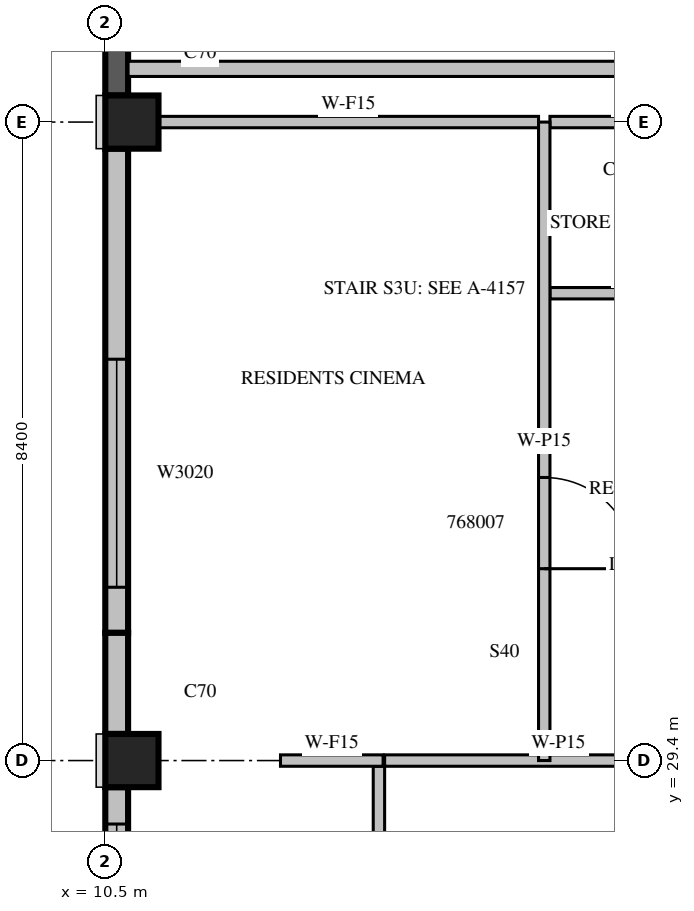
"""IFC4 building model, lengths in metres.
Left out: names, types, materials, properties, quantities, classifications, styles, units other than length and angle.
Written with IfcOpenShell. Run it as: python <this file> out.ifc"""

import sys

from ifc_helpers import new_model, si_unit, direction, frame, frame_2d, origin, origin_2d, place, context, subcontext, project, spatial, rectangle, extrude, source, transform, mapped, element, fill, save


model = new_model("IFC4")
c1 = context("Model", 3, precision=1e-05, world=origin(), true_north=direction((0.0, 1.0)))
c2 = subcontext(c1, "Body", "Model", "MODEL_VIEW")
j1 = project(units=[si_unit("LENGTHUNIT", "METRE"), si_unit("PLANEANGLEUNIT", "RADIAN")], contexts=[c1])
p1 = place(None, origin())
s1 = spatial("IfcSite", under=j1, at=p1, CompositionType="ELEMENT")
p2 = place(p1, origin())
s2 = spatial("IfcBuilding", under=s1, at=p2, CompositionType="ELEMENT")
p3 = place(p2, frame((0.0, 0.0, 298.5)))
s3 = spatial("IfcBuildingStorey", under=s2, at=p3, CompositionType="ELEMENT", Elevation=298.5)
m1 = source(origin(), c2, "Body", "SweptSolid", [
    extrude(rectangle(XDim=0.7, YDim=0.7, at=origin_2d()), origin(), (0.0, 0.0, 1.0), 3.5),
])
for number, where, z_axis, x_axis in (
    (1, (10.85, 29.4, 0.0), (0.0, 0.0, 1.0), (1.0, 0.0, 0.0)),
    (2, (10.85, 37.8, 0.0), (0.0, 0.0, 1.0), (1.0, 0.0, 0.0)),
):
    element("IfcColumn", number, at=place(p3, frame(where, z_axis=z_axis, x_axis=x_axis)), inside=s3, PredefinedType="COLUMN", context=c2, shape_type="MappedRepresentation", body=[
        mapped(m1, transform((0.0, 0.0, 0.0), scale=1.0)),
    ])
m2 = source(origin(), c2, "Body", "SweptSolid", [
    extrude(rectangle(XDim=5.53, YDim=0.3, at=frame_2d((2.765, 0.0))), origin(), (0.0, 0.0, 1.0), 3.1),
])
p4 = place(p3, frame((10.65, 43.68, 0.0), z_axis=(0.0, 0.0, 1.0), x_axis=(0.0, -1.0, 0.0)))
e3 = element("IfcWall", 3, at=p4, inside=s3, PredefinedType="SOLIDWALL", context=c2, shape_type="MappedRepresentation", body=[
    mapped(m2, transform((0.0, 0.0, 0.0), scale=1.0)),
])
m3 = source(origin(), c2, "Body", "SweptSolid", [
    extrude(rectangle(XDim=6.37, YDim=0.3, at=frame_2d((3.185, 0.0))), origin(), (0.0, 0.0, 1.0), 3.1),
])
p5 = place(p3, frame((10.65, 37.45, 0.0), z_axis=(0.0, 0.0, 1.0), x_axis=(0.0, -1.0, 0.0)))
e4 = element("IfcWall", 4, at=p5, inside=s3, PredefinedType="STANDARD", context=c2, shape_type="MappedRepresentation", body=[
    mapped(m3, transform((0.0, 0.0, 0.0), scale=1.0)),
])
m4 = source(origin(), c2, "Body", "SweptSolid", [
    extrude(rectangle(XDim=3.0, YDim=2.0, at=frame_2d((1.5, 1.0))), frame((0.0, 0.16, 0.0), z_axis=(0.0, -1.0, 0.0), x_axis=(1.0, 0.0, 0.0)), (0.0, 0.0, 1.0), 0.32),
])
p6 = place(p5, frame((2.77, 0.0, 0.6)))
e5 = element("IfcOpeningElement", 5, at=p6, cuts=e4, PredefinedType="OPENING", context=c2, shape_type="MappedRepresentation", body=[
    mapped(m4, transform((0.0, 0.0, 0.0), scale=1.0)),
])
m5 = source(origin(), c2, "Body", "SweptSolid", [
    extrude(rectangle(XDim=1.33, YDim=0.3, at=frame_2d((0.665, 0.0))), origin(), (0.0, 0.0, 1.0), 3.1),
])
p7 = place(p3, frame((10.65, 31.08, 0.0), z_axis=(0.0, 0.0, 1.0), x_axis=(0.0, -1.0, 0.0)))
e6 = element("IfcWall", 6, at=p7, inside=s3, PredefinedType="STANDARD", context=c2, shape_type="MappedRepresentation", body=[
    mapped(m5, transform((0.0, 0.0, 0.0), scale=1.0)),
])
m6 = source(origin(), c2, "Body", "SweptSolid", [
    extrude(rectangle(XDim=2.17, YDim=0.3, at=frame_2d((1.085, 0.0))), origin(), (0.0, 0.0, 1.0), 3.1),
])
p8 = place(p3, frame((10.65, 29.05, 0.0), z_axis=(0.0, 0.0, 1.0), x_axis=(0.0, -1.0, 0.0)))
e7 = element("IfcWall", 7, at=p8, inside=s3, PredefinedType="STANDARD", context=c2, shape_type="MappedRepresentation", body=[
    mapped(m6, transform((0.0, 0.0, 0.0), scale=1.0)),
])
m7 = source(origin(), c2, "Body", "SweptSolid", [
    extrude(rectangle(XDim=1.2, YDim=2.0, at=frame_2d((0.6, 1.0))), frame((0.0, 0.16, 0.0), z_axis=(0.0, -1.0, 0.0), x_axis=(1.0, 0.0, 0.0)), (0.0, 0.0, 1.0), 0.32),
])
p9 = place(p8, frame((0.485, 0.0, 0.6)))
e8 = element("IfcOpeningElement", 8, at=p9, cuts=e7, PredefinedType="OPENING", context=c2, shape_type="MappedRepresentation", body=[
    mapped(m7, transform((0.0, 0.0, 0.0), scale=1.0)),
])
m8 = source(origin(), c2, "Body", "SweptSolid", [
    extrude(rectangle(XDim=8.0, YDim=0.2, at=frame_2d((4.0, 0.0))), origin(), (0.0, 0.0, 1.0), 3.1),
])
p10 = place(p3, frame((10.8, 38.5, 0.0), z_axis=(0.0, 0.0, 1.0), x_axis=(1.0, 0.0, 0.0)))
e9 = element("IfcWall", 9, at=p10, inside=s3, PredefinedType="PARTITIONING", context=c2, shape_type="MappedRepresentation", body=[
    mapped(m8, transform((0.0, 0.0, 0.0), scale=1.0)),
])
m9 = source(origin(), c2, "Body", "SweptSolid", [
    extrude(rectangle(XDim=4.575, YDim=0.15, at=frame_2d((2.288, 0.0))), origin(), (0.0, 0.0, 1.0), 3.1),
])
p11 = place(p3, frame((18.75, 29.4, 0.0), z_axis=(0.0, 0.0, 1.0), x_axis=(-1.0, 0.0, 0.0)))
e10 = element("IfcWall", 10, at=p11, inside=s3, PredefinedType="PARTITIONING", context=c2, shape_type="MappedRepresentation", body=[
    mapped(m9, transform((0.0, 0.0, 0.0), scale=1.0)),
])
m10 = source(origin(), c2, "Body", "SweptSolid", [
    extrude(rectangle(XDim=7.725, YDim=0.15, at=frame_2d((3.862, 0.0))), origin(), (0.0, 0.0, 1.0), 3.1),
])
p12 = place(p3, frame((14.1, 29.325, 0.0), z_axis=(0.0, 0.0, 1.0), x_axis=(0.0, -1.0, 0.0)))
e11 = element("IfcWall", 11, at=p12, inside=s3, PredefinedType="PARTITIONING", context=c2, shape_type="MappedRepresentation", body=[
    mapped(m10, transform((0.0, 0.0, 0.0), scale=1.0)),
])
m11 = source(origin(), c2, "Body", "SweptSolid", [
    extrude(rectangle(XDim=1.0, YDim=2.1, at=frame_2d((0.5, 1.05))), frame((0.0, 0.085, 0.0), z_axis=(0.0, -1.0, 0.0), x_axis=(1.0, 0.0, 0.0)), (0.0, 0.0, 1.0), 0.17),
])
p13 = place(p12, frame((6.275, 0.0, 0.0)))
e12 = element("IfcOpeningElement", 12, at=p13, cuts=e11, PredefinedType="OPENING", context=c2, shape_type="MappedRepresentation", body=[
    mapped(m11, transform((0.0, 0.0, 0.0), scale=1.0)),
])
m12 = source(origin(), c2, "Body", "SweptSolid", [
    extrude(rectangle(XDim=2.4, YDim=0.15, at=frame_2d((1.2, 0.0))), origin(), (0.0, 0.0, 1.0), 3.1),
])
p14 = place(p3, frame((18.75, 35.548, 0.0), z_axis=(0.0, 0.0, 1.0), x_axis=(-1.0, 0.0, 0.0)))
e13 = element("IfcWall", 13, at=p14, inside=s3, PredefinedType="PARTITIONING", context=c2, shape_type="MappedRepresentation", body=[
    mapped(m12, transform((0.0, 0.0, 0.0), scale=1.0)),
])
m13 = source(origin(), c2, "Body", "SweptSolid", [
    extrude(rectangle(XDim=1.35, YDim=0.15, at=frame_2d((0.675, 0.0))), origin(), (0.0, 0.0, 1.0), 3.1),
])
p15 = place(p3, frame((14.155, 29.4, 0.0), z_axis=(0.0, 0.0, 1.0), x_axis=(-1.0, 0.0, 0.0)))
e14 = element("IfcWall", 14, at=p15, inside=s3, PredefinedType="PARTITIONING", context=c2, shape_type="MappedRepresentation", body=[
    mapped(m13, transform((0.0, 0.0, 0.0), scale=1.0)),
])
m14 = source(origin(), c2, "Body", "SweptSolid", [
    extrude(rectangle(XDim=5.001, YDim=0.15, at=frame_2d((2.501, 0.0))), origin(), (0.0, 0.0, 1.0), 3.1),
])
p16 = place(p3, frame((16.2, 37.8, 0.0), z_axis=(0.0, 0.0, 1.0), x_axis=(-1.0, 0.0, 0.0)))
e15 = element("IfcWall", 15, at=p16, inside=s3, PredefinedType="PARTITIONING", context=c2, shape_type="MappedRepresentation", body=[
    mapped(m14, transform((0.0, 0.0, 0.0), scale=1.0)),
])
p17 = place(p3, frame((18.75, 37.8, 0.0), z_axis=(0.0, 0.0, 1.0), x_axis=(-1.0, 0.0, 0.0)))
e16 = element("IfcWall", 16, at=p17, inside=s3, PredefinedType="PARTITIONING", context=c2, shape_type="MappedRepresentation", body=[
    mapped(m12, transform((0.0, 0.0, 0.0), scale=1.0)),
])
m15 = source(origin(), c2, "Body", "SweptSolid", [
    extrude(rectangle(XDim=8.4, YDim=0.15, at=frame_2d((4.2, 0.0))), origin(), (0.0, 0.0, 1.0), 3.1),
])
p18 = place(p3, frame((16.275, 29.4, 0.0), z_axis=(0.0, 0.0, 1.0), x_axis=(0.0, 1.0, 0.0)))
e17 = element("IfcWall", 17, at=p18, inside=s3, PredefinedType="PARTITIONING", context=c2, shape_type="MappedRepresentation", body=[
    mapped(m15, transform((0.0, 0.0, 0.0), scale=1.0)),
])
m16 = source(origin(), c2, "Body", "SweptSolid", [
    extrude(rectangle(XDim=1.2, YDim=2.1, at=frame_2d((0.6, 1.05))), frame((0.0, 0.085, 0.0), z_axis=(0.0, -1.0, 0.0), x_axis=(1.0, 0.0, 0.0)), (0.0, 0.0, 1.0), 0.17),
])
p19 = place(p18, frame((2.524, 0.0, 0.0)))
e18 = element("IfcOpeningElement", 18, at=p19, cuts=e17, PredefinedType="OPENING", context=c2, shape_type="MappedRepresentation", body=[
    mapped(m16, transform((0.0, 0.0, 0.0), scale=1.0)),
])
m17 = source(origin(), c2, "Body", "SweptSolid", [
    extrude(rectangle(XDim=3.0, YDim=2.0, at=frame_2d((1.5, 1.0))), frame((0.0, 0.03, 0.0), z_axis=(0.0, -1.0, 0.0), x_axis=(1.0, 0.0, 0.0)), (0.0, 0.0, 1.0), 0.06),
])
p20 = place(p6, origin())
e19 = element("IfcWindow", 19, at=p20, inside=s3, PartitioningType="SINGLE_PANEL", PredefinedType="WINDOW", context=c2, shape_type="MappedRepresentation", body=[
    mapped(m17, transform((0.0, 0.0, 0.0), scale=1.0)),
])
fill(e5, e19)
m18 = source(origin(), c2, "Body", "SweptSolid", [
    extrude(rectangle(XDim=1.2, YDim=2.0, at=frame_2d((0.6, 1.0))), frame((0.0, 0.03, 0.0), z_axis=(0.0, -1.0, 0.0), x_axis=(1.0, 0.0, 0.0)), (0.0, 0.0, 1.0), 0.06),
])
p21 = place(p9, origin())
e20 = element("IfcWindow", 20, at=p21, inside=s3, PartitioningType="SINGLE_PANEL", PredefinedType="WINDOW", context=c2, shape_type="MappedRepresentation", body=[
    mapped(m18, transform((0.0, 0.0, 0.0), scale=1.0)),
])
fill(e8, e20)
m19 = source(origin(), c2, "Body", "SweptSolid", [
    extrude(rectangle(XDim=1.2, YDim=2.1, at=frame_2d((0.6, 1.05))), frame((0.0, 0.025, 0.0), z_axis=(0.0, -1.0, 0.0), x_axis=(1.0, 0.0, 0.0)), (0.0, 0.0, 1.0), 0.05),
])
p22 = place(p19, origin())
e21 = element("IfcDoor", 21, at=p22, inside=s3, OperationType="SINGLE_SWING_RIGHT", PredefinedType="DOOR", context=c2, shape_type="MappedRepresentation", body=[
    mapped(m19, transform((0.0, 0.0, 0.0), scale=1.0)),
])
fill(e18, e21)
save(model, sys.argv[1])
